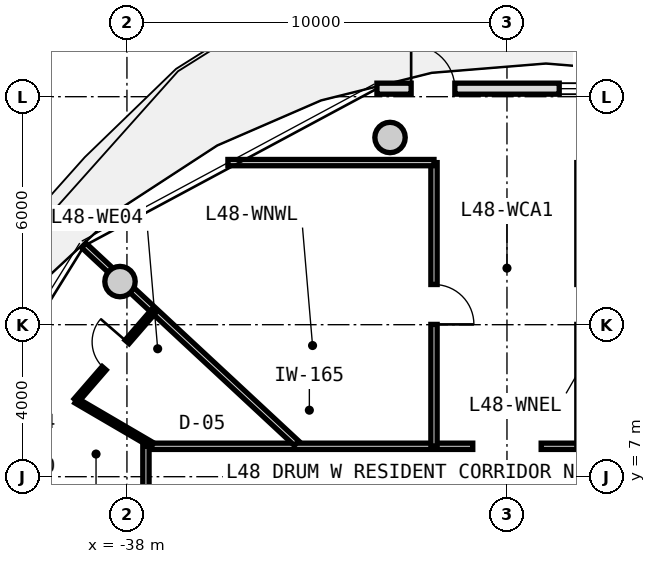
"""IFC4 building model, lengths in metres.
Left out: names, types, materials, properties, quantities, classifications, styles, units other than length and angle.
Written with IfcOpenShell. Run it as: python <this file> out.ifc"""

import sys

from ifc_helpers import new_model, si_unit, direction, frame, frame_2d, origin, origin_2d, place, context, subcontext, project, spatial, rectangle, circle, extrude, source, transform, mapped, element, fill, save


model = new_model("IFC4")
c1 = context("Model", 3, precision=1e-05, world=origin(), true_north=direction((0.0, 1.0)))
c2 = subcontext(c1, "Body", "Model", "MODEL_VIEW")
j1 = project(units=[si_unit("LENGTHUNIT", "METRE"), si_unit("PLANEANGLEUNIT", "RADIAN")], contexts=[c1])
p1 = place(None, origin())
s1 = spatial("IfcSite", under=j1, at=p1, CompositionType="ELEMENT")
p2 = place(p1, origin())
s2 = spatial("IfcBuilding", under=s1, at=p2, CompositionType="ELEMENT")
p3 = place(p2, frame((0.0, 0.0, 155.65)))
s3 = spatial("IfcBuildingStorey", under=s2, at=p3, CompositionType="ELEMENT", Elevation=155.65)
m1 = source(origin(), c2, "Body", "SweptSolid", [
    extrude(circle(Radius=0.4, at=origin_2d()), origin(), (0.0, 0.0, 1.0), 3.05),
])
for number, where, z_axis, x_axis in (
    (1, (-31.077, 15.926, 0.0), (0.0, 0.0, 1.0), (1.0, 0.0, 0.0)),
    (2, (-38.183, 12.135, 0.0), (0.0, 0.0, 1.0), (1.0, 0.0, 0.0)),
):
    element("IfcColumn", number, at=place(p3, frame(where, z_axis=z_axis, x_axis=x_axis)), inside=s3, PredefinedType="COLUMN", context=c2, shape_type="MappedRepresentation", body=[
        mapped(m1, transform((0.0, 0.0, 0.0), x_axis=(1.0, 0.0, 0.0), y_axis=(0.0, 1.0, 0.0), z_axis=(0.0, 0.0, 1.0), scale=1.0)),
    ])
m2 = source(origin(), c2, "Body", "SweptSolid", [
    extrude(rectangle(XDim=8.893, YDim=0.29, at=frame_2d((4.447, 0.0))), origin(), (0.0, 0.0, 1.0), 2.81),
])
p4 = place(p3, frame((-31.422, 17.211, 0.0), z_axis=(0.0, 0.0, 1.0), x_axis=(1.0, 0.0, 0.0)))
e3 = element("IfcWall", 3, at=p4, inside=s3, PredefinedType="SOLIDWALL", context=c2, shape_type="MappedRepresentation", body=[
    mapped(m2, transform((0.0, 0.0, 0.0), x_axis=(1.0, 0.0, 0.0), y_axis=(0.0, 1.0, 0.0), z_axis=(0.0, 0.0, 1.0), scale=1.0)),
])
p5 = place(p4, frame((0.9, 0.0, 0.0)))
e4 = element("IfcOpeningElement", 4, at=p5, cuts=e3, PredefinedType="OPENING", context=c2, shape_type="SweptSolid", body=[
    extrude(rectangle(XDim=1.15, YDim=2.25, at=frame_2d((0.575, 1.125))), frame((0.0, 0.155, 0.0), z_axis=(0.0, -1.0, 0.0), x_axis=(1.0, 0.0, 0.0)), (0.0, 0.0, 1.0), 0.31),
])
p6 = place(p4, frame((4.796, 0.0, 0.85)))
e5 = element("IfcOpeningElement", 5, at=p6, cuts=e3, PredefinedType="OPENING", context=c2, shape_type="SweptSolid", body=[
    extrude(rectangle(XDim=1.2, YDim=1.5, at=frame_2d((0.6, 0.75))), frame((0.0, 0.155, 0.0), z_axis=(0.0, -1.0, 0.0), x_axis=(1.0, 0.0, 0.0)), (0.0, 0.0, 1.0), 0.31),
])
m3 = source(origin(), c2, "Body", "SweptSolid", [
    extrude(rectangle(XDim=8.6, YDim=0.165, at=frame_2d((4.3, 0.0))), origin(), (0.0, 0.0, 1.0), 2.795),
])
p7 = place(p3, frame((-37.5, 7.8, 0.0), z_axis=(0.0, 0.0, 1.0), x_axis=(1.0, 0.0, 0.0)))
e6 = element("IfcWall", 6, at=p7, inside=s3, PredefinedType="PARTITIONING", context=c2, shape_type="MappedRepresentation", body=[
    mapped(m3, transform((0.0, 0.0, 0.0), x_axis=(1.0, 0.0, 0.0), y_axis=(0.0, 1.0, 0.0), z_axis=(0.0, 0.0, 1.0), scale=1.0)),
])
p8 = place(p3, frame((-27.1, 7.8, 0.0), z_axis=(0.0, 0.0, 1.0), x_axis=(1.0, 0.0, 0.0)))
e7 = element("IfcWall", 7, at=p8, inside=s3, PredefinedType="PARTITIONING", context=c2, shape_type="MappedRepresentation", body=[
    mapped(m3, transform((0.0, 0.0, 0.0), x_axis=(1.0, 0.0, 0.0), y_axis=(0.0, 1.0, 0.0), z_axis=(0.0, 0.0, 1.0), scale=1.0)),
])
p9 = place(p8, frame((6.96, 0.0, 0.0)))
e8 = element("IfcOpeningElement", 8, at=p9, cuts=e7, PredefinedType="OPENING", context=c2, shape_type="SweptSolid", body=[
    extrude(rectangle(XDim=1.05, YDim=2.15, at=frame_2d((0.525, 1.075))), frame((0.0, 0.093, 0.0), z_axis=(0.0, -1.0, 0.0), x_axis=(1.0, 0.0, 0.0)), (0.0, 0.0, 1.0), 0.185),
])
p10 = place(p8, frame((3.904, 0.0, 0.0)))
e9 = element("IfcOpeningElement", 9, at=p10, cuts=e7, PredefinedType="OPENING", context=c2, shape_type="SweptSolid", body=[
    extrude(rectangle(XDim=1.05, YDim=2.15, at=frame_2d((0.525, 1.075))), frame((0.0, 0.093, 0.0), z_axis=(0.0, -1.0, 0.0), x_axis=(1.0, 0.0, 0.0)), (0.0, 0.0, 1.0), 0.185),
])
p11 = place(p8, frame((2.347, 0.0, 0.0)))
e10 = element("IfcOpeningElement", 10, at=p11, cuts=e7, PredefinedType="OPENING", context=c2, shape_type="SweptSolid", body=[
    extrude(rectangle(XDim=1.05, YDim=2.15, at=frame_2d((0.525, 1.075))), frame((0.0, 0.093, 0.0), z_axis=(0.0, -1.0, 0.0), x_axis=(1.0, 0.0, 0.0)), (0.0, 0.0, 1.0), 0.185),
])
m4 = source(origin(), c2, "Body", "SweptSolid", [
    extrude(rectangle(XDim=15.6, YDim=0.165, at=frame_2d((7.8, 0.0))), origin(), (0.0, 0.0, 1.0), 2.795),
])
p12 = place(p3, frame((-37.5, -7.8, 0.0), z_axis=(0.0, 0.0, 1.0), x_axis=(0.0, 1.0, 0.0)))
e11 = element("IfcWall", 11, at=p12, inside=s3, PredefinedType="PARTITIONING", context=c2, shape_type="MappedRepresentation", body=[
    mapped(m4, transform((0.0, 0.0, 0.0), x_axis=(1.0, 0.0, 0.0), y_axis=(0.0, 1.0, 0.0), z_axis=(0.0, 0.0, 1.0), scale=1.0)),
])
p13 = place(p12, frame((13.16, 0.0, 0.0)))
e12 = element("IfcOpeningElement", 12, at=p13, cuts=e11, PredefinedType="OPENING", context=c2, shape_type="SweptSolid", body=[
    extrude(rectangle(XDim=1.25, YDim=2.2, at=frame_2d((0.625, 1.1))), frame((0.0, 0.093, 0.0), z_axis=(0.0, -1.0, 0.0), x_axis=(1.0, 0.0, 0.0)), (0.0, 0.0, 1.0), 0.185),
])
p14 = place(p12, frame((7.757, 0.0, 0.0)))
e13 = element("IfcOpeningElement", 13, at=p14, cuts=e11, PredefinedType="OPENING", context=c2, shape_type="SweptSolid", body=[
    extrude(rectangle(XDim=1.25, YDim=2.2, at=frame_2d((0.625, 1.1))), frame((0.0, 0.093, 0.0), z_axis=(0.0, -1.0, 0.0), x_axis=(1.0, 0.0, 0.0)), (0.0, 0.0, 1.0), 0.185),
])
p15 = place(p12, frame((1.62, 0.0, 0.0)))
e14 = element("IfcOpeningElement", 14, at=p15, cuts=e11, PredefinedType="OPENING", context=c2, shape_type="SweptSolid", body=[
    extrude(rectangle(XDim=1.25, YDim=2.2, at=frame_2d((0.625, 1.1))), frame((0.0, 0.093, 0.0), z_axis=(0.0, -1.0, 0.0), x_axis=(1.0, 0.0, 0.0)), (0.0, 0.0, 1.0), 0.185),
])
m5 = source(origin(), c2, "Body", "SweptSolid", [
    extrude(rectangle(XDim=7.648, YDim=0.165, at=frame_2d((3.824, 0.0))), origin(), (0.0, 0.0, 1.0), 2.435),
])
p16 = place(p3, frame((-33.538, 7.88, 0.0), z_axis=(0.0, 0.0, 1.0), x_axis=(-0.732167856666, 0.681124239522, 0.0)))
e15 = element("IfcWall", 15, at=p16, inside=s3, PredefinedType="PARTITIONING", context=c2, shape_type="MappedRepresentation", body=[
    mapped(m5, transform((0.0, 0.0, 0.0), x_axis=(1.0, 0.0, 0.0), y_axis=(0.0, 1.0, 0.0), z_axis=(0.0, 0.0, 1.0), scale=1.0)),
])
m6 = source(origin(), c2, "Body", "SweptSolid", [
    extrude(rectangle(XDim=7.465, YDim=0.165, at=frame_2d((3.733, 0.0))), origin(), (0.0, 0.0, 1.0), 2.345),
])
p17 = place(p3, frame((-29.92, 7.8, 0.0), z_axis=(0.0, 0.0, 1.0), x_axis=(0.0, 1.0, 0.0)))
e16 = element("IfcWall", 16, at=p17, inside=s3, PredefinedType="PARTITIONING", context=c2, shape_type="MappedRepresentation", body=[
    mapped(m6, transform((0.0, 0.0, 0.0), x_axis=(1.0, 0.0, 0.0), y_axis=(0.0, 1.0, 0.0), z_axis=(0.0, 0.0, 1.0), scale=1.0)),
])
p18 = place(p17, frame((3.208, 0.0, 0.0)))
e17 = element("IfcOpeningElement", 17, at=p18, cuts=e16, PredefinedType="OPENING", context=c2, shape_type="SweptSolid", body=[
    extrude(rectangle(XDim=1.05, YDim=2.15, at=frame_2d((0.525, 1.075))), frame((0.0, 0.093, 0.0), z_axis=(0.0, -1.0, 0.0), x_axis=(1.0, 0.0, 0.0)), (0.0, 0.0, 1.0), 0.185),
])
m7 = source(origin(), c2, "Body", "SweptSolid", [
    extrude(rectangle(XDim=5.423, YDim=0.165, at=frame_2d((2.711, 0.0))), origin(), (0.0, 0.0, 1.0), 2.795),
])
p19 = place(p3, frame((-35.343, 15.265, 0.0), z_axis=(0.0, 0.0, 1.0), x_axis=(1.0, 0.0, 0.0)))
e18 = element("IfcWall", 18, at=p19, inside=s3, PredefinedType="PARTITIONING", context=c2, shape_type="MappedRepresentation", body=[
    mapped(m7, transform((0.0, 0.0, 0.0), x_axis=(1.0, 0.0, 0.0), y_axis=(0.0, 1.0, 0.0), z_axis=(0.0, 0.0, 1.0), scale=1.0)),
])
m8 = source(origin(), c2, "Body", "SweptSolid", [
    extrude(rectangle(XDim=2.323, YDim=0.14, at=frame_2d((1.161, 0.0))), origin(), (0.0, 0.0, 1.0), 2.795),
])
p20 = place(p3, frame((-37.331, 7.83, 0.0), z_axis=(0.0, 0.0, 1.0), x_axis=(-0.863343994595, 0.504615841009, 0.0)))
e19 = element("IfcWall", 19, at=p20, inside=s3, PredefinedType="PARTITIONING", context=c2, shape_type="MappedRepresentation", body=[
    mapped(m8, transform((0.0, 0.0, 0.0), x_axis=(1.0, 0.0, 0.0), y_axis=(0.0, 1.0, 0.0), z_axis=(0.0, 0.0, 1.0), scale=1.0)),
])
m9 = source(origin(), c2, "Body", "SweptSolid", [
    extrude(rectangle(XDim=3.171, YDim=0.14, at=frame_2d((1.585, 0.0))), origin(), (0.0, 0.0, 1.0), 2.795),
])
p21 = place(p3, frame((-39.336, 9.002, 0.0), z_axis=(0.0, 0.0, 1.0), x_axis=(0.654953989592, 0.755668757801, 0.0)))
e20 = element("IfcWall", 20, at=p21, inside=s3, PredefinedType="PARTITIONING", context=c2, shape_type="MappedRepresentation", body=[
    mapped(m9, transform((0.0, 0.0, 0.0), x_axis=(1.0, 0.0, 0.0), y_axis=(0.0, 1.0, 0.0), z_axis=(0.0, 0.0, 1.0), scale=1.0)),
])
p22 = place(p21, frame((1.125, 0.0, 0.0)))
e21 = element("IfcOpeningElement", 21, at=p22, cuts=e20, PredefinedType="OPENING", context=c2, shape_type="SweptSolid", body=[
    extrude(rectangle(XDim=0.92, YDim=2.1, at=frame_2d((0.46, 1.05))), frame((0.0, 0.08, 0.0), z_axis=(0.0, -1.0, 0.0), x_axis=(1.0, 0.0, 0.0)), (0.0, 0.0, 1.0), 0.16),
])
m10 = source(origin(), c2, "Body", "SweptSolid", [
    extrude(rectangle(XDim=1.15, YDim=2.25, at=frame_2d((0.575, 1.125))), frame((0.0, 0.025, 0.0), z_axis=(0.0, -1.0, 0.0), x_axis=(1.0, 0.0, 0.0)), (0.0, 0.0, 1.0), 0.05),
])
p23 = place(p5, origin())
e22 = element("IfcDoor", 22, at=p23, inside=s3, OperationType="SINGLE_SWING_LEFT", PredefinedType="DOOR", context=c2, shape_type="MappedRepresentation", body=[
    mapped(m10, transform((0.0, 0.0, 0.0), x_axis=(1.0, 0.0, 0.0), y_axis=(0.0, 1.0, 0.0), z_axis=(0.0, 0.0, 1.0), scale=1.0)),
])
fill(e4, e22)
m11 = source(origin(), c2, "Body", "SweptSolid", [
    extrude(rectangle(XDim=1.2, YDim=1.5, at=frame_2d((0.6, 0.75))), frame((0.0, 0.03, 0.0), z_axis=(0.0, -1.0, 0.0), x_axis=(1.0, 0.0, 0.0)), (0.0, 0.0, 1.0), 0.06),
])
p24 = place(p6, origin())
e23 = element("IfcWindow", 23, at=p24, inside=s3, PartitioningType="SINGLE_PANEL", PredefinedType="WINDOW", context=c2, shape_type="MappedRepresentation", body=[
    mapped(m11, transform((0.0, 0.0, 0.0), x_axis=(1.0, 0.0, 0.0), y_axis=(0.0, 1.0, 0.0), z_axis=(0.0, 0.0, 1.0), scale=1.0)),
])
fill(e5, e23)
m12 = source(origin(), c2, "Body", "SweptSolid", [
    extrude(rectangle(XDim=1.05, YDim=2.15, at=frame_2d((0.525, 1.075))), frame((0.0, 0.025, 0.0), z_axis=(0.0, -1.0, 0.0), x_axis=(1.0, 0.0, 0.0)), (0.0, 0.0, 1.0), 0.05),
])
p25 = place(p18, frame((1.05, 0.0, 0.0), z_axis=(0.0, 0.0, 1.0), x_axis=(-1.0, 0.0, 0.0)))
e24 = element("IfcDoor", 24, at=p25, inside=s3, OperationType="SINGLE_SWING_RIGHT", PredefinedType="DOOR", context=c2, shape_type="MappedRepresentation", body=[
    mapped(m12, transform((0.0, 0.0, 0.0), x_axis=(1.0, 0.0, 0.0), y_axis=(0.0, 1.0, 0.0), z_axis=(0.0, 0.0, 1.0), scale=1.0)),
])
fill(e17, e24)
m13 = source(origin(), c2, "Body", "SweptSolid", [
    extrude(rectangle(XDim=0.92, YDim=2.1, at=frame_2d((0.46, 1.05))), frame((0.0, 0.025, 0.0), z_axis=(0.0, -1.0, 0.0), x_axis=(1.0, 0.0, 0.0)), (0.0, 0.0, 1.0), 0.05),
])
p26 = place(p22, origin())
e25 = element("IfcDoor", 25, at=p26, inside=s3, OperationType="SINGLE_SWING_RIGHT", PredefinedType="DOOR", context=c2, shape_type="MappedRepresentation", body=[
    mapped(m13, transform((0.0, 0.0, 0.0), x_axis=(1.0, 0.0, 0.0), y_axis=(0.0, 1.0, 0.0), z_axis=(0.0, 0.0, 1.0), scale=1.0)),
])
fill(e21, e25)
save(model, sys.argv[1])
